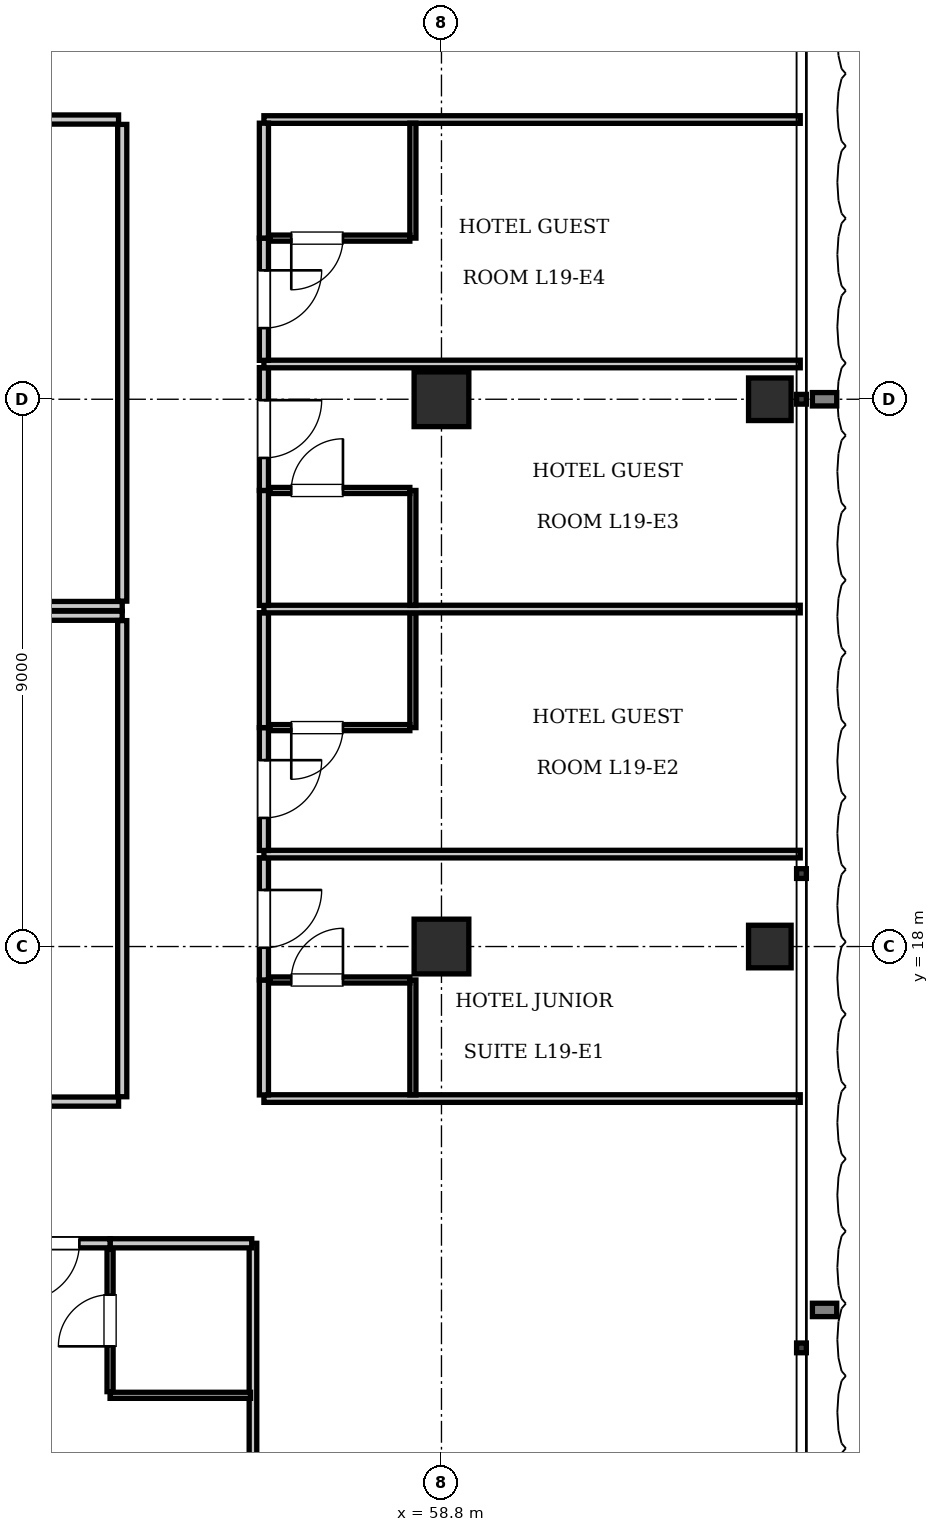
"""IFC4 building model, lengths in metres.
Left out: names, types, materials, properties, quantities, classifications, styles, units other than length and angle.
Written with IfcOpenShell. Run it as: python <this file> out.ifc"""

import sys

from ifc_helpers import new_model, si_unit, direction, frame, frame_2d, origin, origin_2d, place, context, subcontext, project, spatial, rectangle, i_section, extrude, element, fill, save


model = new_model("IFC4")
c1 = context("Model", 3, precision=1e-05, world=origin(), true_north=direction((0.0, 1.0)))
c2 = subcontext(c1, "Body", "Model", "MODEL_VIEW")
j1 = project(units=[si_unit("LENGTHUNIT", "METRE"), si_unit("PLANEANGLEUNIT", "RADIAN")], contexts=[c1])
p1 = place(None, origin())
s1 = spatial("IfcSite", under=j1, at=p1, CompositionType="ELEMENT")
p2 = place(p1, origin())
s2 = spatial("IfcBuilding", under=s1, at=p2, CompositionType="ELEMENT")
p3 = place(p2, frame((0.0, 0.0, 80.85)))
s3 = spatial("IfcBuildingStorey", under=s2, at=p3, CompositionType="ELEMENT", Elevation=80.85)
for number, where, z_axis, x_axis in (
    (1, (58.8, 18.0, 0.0), (0.0, 0.0, 1.0), (1.0, 0.0, 0.0)),
    (2, (58.8, 27.0, 0.0), (0.0, 0.0, 1.0), (1.0, 0.0, 0.0)),
):
    element("IfcColumn", number, at=place(p3, frame(where, z_axis=z_axis, x_axis=x_axis)), inside=s3, PredefinedType="COLUMN", context=c2, shape_type="SweptSolid", body=[
        extrude(rectangle(XDim=0.9, YDim=0.9, at=origin_2d()), origin(), (0.0, 0.0, 1.0), 3.85),
    ])
for number, where, z_axis, x_axis in (
    (3, (64.2, 18.0, 0.0), (0.0, 0.0, 1.0), (1.0, 0.0, 0.0)),
    (4, (64.2, 27.0, 0.0), (0.0, 0.0, 1.0), (1.0, 0.0, 0.0)),
):
    element("IfcColumn", number, at=place(p3, frame(where, z_axis=z_axis, x_axis=x_axis)), inside=s3, PredefinedType="COLUMN", context=c2, shape_type="SweptSolid", body=[
        extrude(i_section(OverallWidth=0.7, OverallDepth=0.7, WebThickness=0.028, FlangeThickness=0.044, at=origin_2d()), origin(), (0.0, 0.0, 1.0), 3.85),
    ])
p4 = place(p3, frame((22.05, 23.6, 0.0), z_axis=(0.0, 0.0, 1.0), x_axis=(1.0, 0.0, 0.0)))
e5 = element("IfcWall", 5, at=p4, inside=s3, PredefinedType="PARTITIONING", context=c2, shape_type="SweptSolid", body=[
    extrude(rectangle(XDim=31.5, YDim=0.15, at=frame_2d((15.75, 0.0))), origin(), (0.0, 0.0, 1.0), 3.61),
])
p5 = place(p3, frame((53.55, 23.68, 0.0), z_axis=(0.0, 0.0, 1.0), x_axis=(0.0, 1.0, 0.0)))
e6 = element("IfcWall", 6, at=p5, inside=s3, PredefinedType="PARTITIONING", context=c2, shape_type="SweptSolid", body=[
    extrude(rectangle(XDim=7.84, YDim=0.15, at=frame_2d((3.92, 0.0))), origin(), (0.0, 0.0, 1.0), 3.61),
])
p6 = place(p3, frame((42.87, 31.6, 0.0), z_axis=(0.0, 0.0, 1.0), x_axis=(1.0, 0.0, 0.0)))
e7 = element("IfcWall", 7, at=p6, inside=s3, PredefinedType="PARTITIONING", context=c2, shape_type="SweptSolid", body=[
    extrude(rectangle(XDim=10.62, YDim=0.15, at=frame_2d((5.31, 0.0))), origin(), (0.0, 0.0, 1.0), 3.61),
])
p7 = place(p6, frame((4.86, 0.0, 0.0)))
e8 = element("IfcOpeningElement", 8, at=p7, cuts=e7, PredefinedType="OPENING", context=c2, shape_type="SweptSolid", body=[
    extrude(rectangle(XDim=0.9, YDim=2.1, at=frame_2d((0.45, 1.05))), frame((0.0, 0.085, 0.0), z_axis=(0.0, -1.0, 0.0), x_axis=(1.0, 0.0, 0.0)), (0.0, 0.0, 1.0), 0.17),
])
p8 = place(p3, frame((22.05, 23.44, 0.0), z_axis=(0.0, 0.0, 1.0), x_axis=(1.0, 0.0, 0.0)))
e9 = element("IfcWall", 9, at=p8, inside=s3, PredefinedType="PARTITIONING", context=c2, shape_type="SweptSolid", body=[
    extrude(rectangle(XDim=31.5, YDim=0.15, at=frame_2d((15.75, 0.0))), origin(), (0.0, 0.0, 1.0), 3.61),
])
p9 = place(p3, frame((53.55, 15.53, 0.0), z_axis=(0.0, 0.0, 1.0), x_axis=(0.0, 1.0, 0.0)))
e10 = element("IfcWall", 10, at=p9, inside=s3, PredefinedType="PARTITIONING", context=c2, shape_type="SweptSolid", body=[
    extrude(rectangle(XDim=7.83, YDim=0.15, at=frame_2d((3.915, 0.0))), origin(), (0.0, 0.0, 1.0), 3.61),
])
p10 = place(p3, frame((40.035, 15.45, 0.0), z_axis=(0.0, 0.0, 1.0), x_axis=(1.0, 0.0, 0.0)))
e11 = element("IfcWall", 11, at=p10, inside=s3, PredefinedType="PARTITIONING", context=c2, shape_type="SweptSolid", body=[
    extrude(rectangle(XDim=13.455, YDim=0.15, at=frame_2d((6.728, 0.0))), origin(), (0.0, 0.0, 1.0), 3.61),
])
p11 = place(p10, frame((6.278, 0.0, 0.0)))
e12 = element("IfcOpeningElement", 12, at=p11, cuts=e11, PredefinedType="OPENING", context=c2, shape_type="SweptSolid", body=[
    extrude(rectangle(XDim=0.9, YDim=2.1, at=frame_2d((0.45, 1.05))), frame((0.0, 0.085, 0.0), z_axis=(0.0, -1.0, 0.0), x_axis=(1.0, 0.0, 0.0)), (0.0, 0.0, 1.0), 0.17),
])
p12 = place(p3, frame((55.7, 0.1, 0.0), z_axis=(0.0, 0.0, 1.0), x_axis=(0.0, 1.0, 0.0)))
e13 = element("IfcWall", 13, at=p12, inside=s3, PredefinedType="PARTITIONING", context=c2, shape_type="SweptSolid", body=[
    extrude(rectangle(XDim=13.02, YDim=0.125, at=frame_2d((6.51, 0.0))), origin(), (0.0, 0.0, 1.0), 3.61),
])
p13 = place(p3, frame((53.35, 13.12, 0.0), z_axis=(0.0, 0.0, 1.0), x_axis=(1.0, 0.0, 0.0)))
e14 = element("IfcWall", 14, at=p13, inside=s3, PredefinedType="PARTITIONING", context=c2, shape_type="SweptSolid", body=[
    extrude(rectangle(XDim=2.33, YDim=0.15, at=frame_2d((1.165, 0.0))), origin(), (0.0, 0.0, 1.0), 3.61),
])
p14 = place(p3, frame((53.35, 10.62, 0.0), z_axis=(0.0, 0.0, 1.0), x_axis=(1.0, 0.0, 0.0)))
e15 = element("IfcWall", 15, at=p14, inside=s3, PredefinedType="PARTITIONING", context=c2, shape_type="SweptSolid", body=[
    extrude(rectangle(XDim=2.31, YDim=0.1, at=frame_2d((1.155, 0.0))), origin(), (0.0, 0.0, 1.0), 3.61),
])
p15 = place(p3, frame((53.35, 10.68, 0.0), z_axis=(0.0, 0.0, 1.0), x_axis=(0.0, 1.0, 0.0)))
e16 = element("IfcWall", 16, at=p15, inside=s3, PredefinedType="PARTITIONING", context=c2, shape_type="SweptSolid", body=[
    extrude(rectangle(XDim=2.34, YDim=0.1, at=frame_2d((1.17, 0.0))), origin(), (0.0, 0.0, 1.0), 3.61),
])
p16 = place(p15, frame((0.745, 0.0, 0.0)))
e17 = element("IfcOpeningElement", 17, at=p16, cuts=e16, PredefinedType="OPENING", context=c2, shape_type="SweptSolid", body=[
    extrude(rectangle(XDim=0.85, YDim=2.1, at=frame_2d((0.425, 1.05))), frame((0.0, 0.06, 0.0), z_axis=(0.0, -1.0, 0.0), x_axis=(1.0, 0.0, 0.0)), (0.0, 0.0, 1.0), 0.12),
])
p17 = place(p3, frame((51.39, 13.12, 0.0), z_axis=(0.0, 0.0, 1.0), x_axis=(1.0, 0.0, 0.0)))
e18 = element("IfcWall", 18, at=p17, inside=s3, PredefinedType="PARTITIONING", context=c2, shape_type="SweptSolid", body=[
    extrude(rectangle(XDim=1.96, YDim=0.15, at=frame_2d((0.98, 0.0))), origin(), (0.0, 0.0, 1.0), 3.61),
])
p18 = place(p17, frame((0.505, 0.0, 0.0)))
e19 = element("IfcOpeningElement", 19, at=p18, cuts=e18, PredefinedType="OPENING", context=c2, shape_type="SweptSolid", body=[
    extrude(rectangle(XDim=0.95, YDim=2.15, at=frame_2d((0.475, 1.075))), frame((0.0, 0.085, 0.0), z_axis=(0.0, -1.0, 0.0), x_axis=(1.0, 0.0, 0.0)), (0.0, 0.0, 1.0), 0.17),
])
for number, where, z_axis, x_axis in (
    (20, (55.88, 15.5, 0.0), (0.0, 0.0, 1.0), (1.0, 0.0, 0.0)),
    (21, (55.88, 31.6, 0.0), (0.0, 0.0, 1.0), (1.0, 0.0, 0.0)),
):
    element("IfcWall", number, at=place(p3, frame(where, z_axis=z_axis, x_axis=x_axis)), inside=s3, PredefinedType="PARTITIONING", context=c2, shape_type="SweptSolid", body=[
        extrude(rectangle(XDim=8.82, YDim=0.125, at=frame_2d((4.41, 0.0))), origin(), (0.0, 0.0, 1.0), 3.61),
    ])
p19 = place(p3, frame((55.88, 15.56, 0.0), z_axis=(0.0, 0.0, 1.0), x_axis=(0.0, 1.0, 0.0)))
e22 = element("IfcWall", 22, at=p19, inside=s3, PredefinedType="PARTITIONING", context=c2, shape_type="SweptSolid", body=[
    extrude(rectangle(XDim=1.89, YDim=0.15, at=frame_2d((0.945, 0.0))), origin(), (0.0, 0.0, 1.0), 3.61),
])
p20 = place(p3, frame((55.88, 17.45, 0.0), z_axis=(0.0, 0.0, 1.0), x_axis=(0.0, 1.0, 0.0)))
e23 = element("IfcWall", 23, at=p20, inside=s3, PredefinedType="PARTITIONING", context=c2, shape_type="SweptSolid", body=[
    extrude(rectangle(XDim=2.01, YDim=0.15, at=frame_2d((1.005, 0.0))), origin(), (0.0, 0.0, 1.0), 3.61),
])
p21 = place(p20, frame((0.53, 0.0, 0.0)))
e24 = element("IfcOpeningElement", 24, at=p21, cuts=e23, PredefinedType="OPENING", context=c2, shape_type="SweptSolid", body=[
    extrude(rectangle(XDim=0.95, YDim=2.15, at=frame_2d((0.475, 1.075))), frame((0.0, 0.085, 0.0), z_axis=(0.0, -1.0, 0.0), x_axis=(1.0, 0.0, 0.0)), (0.0, 0.0, 1.0), 0.17),
])
p22 = place(p3, frame((58.33, 15.56, 0.0), z_axis=(0.0, 0.0, 1.0), x_axis=(0.0, 1.0, 0.0)))
e25 = element("IfcWall", 25, at=p22, inside=s3, PredefinedType="PARTITIONING", context=c2, shape_type="SweptSolid", body=[
    extrude(rectangle(XDim=1.89, YDim=0.1, at=frame_2d((0.945, 0.0))), origin(), (0.0, 0.0, 1.0), 3.61),
])
p23 = place(p3, frame((55.98, 17.45, 0.0), z_axis=(0.0, 0.0, 1.0), x_axis=(1.0, 0.0, 0.0)))
e26 = element("IfcWall", 26, at=p23, inside=s3, PredefinedType="PARTITIONING", context=c2, shape_type="SweptSolid", body=[
    extrude(rectangle(XDim=2.3, YDim=0.1, at=frame_2d((1.15, 0.0))), origin(), (0.0, 0.0, 1.0), 3.61),
])
p24 = place(p23, frame((0.35, 0.0, 0.0)))
e27 = element("IfcOpeningElement", 27, at=p24, cuts=e26, PredefinedType="OPENING", context=c2, shape_type="SweptSolid", body=[
    extrude(rectangle(XDim=0.85, YDim=2.1, at=frame_2d((0.425, 1.05))), frame((0.0, 0.06, 0.0), z_axis=(0.0, -1.0, 0.0), x_axis=(1.0, 0.0, 0.0)), (0.0, 0.0, 1.0), 0.12),
])
p25 = place(p3, frame((55.88, 19.52, 0.0), z_axis=(0.0, 0.0, 1.0), x_axis=(1.0, 0.0, 0.0)))
e28 = element("IfcWall", 28, at=p25, inside=s3, PredefinedType="PARTITIONING", context=c2, shape_type="SweptSolid", body=[
    extrude(rectangle(XDim=8.82, YDim=0.125, at=frame_2d((4.41, 0.0))), origin(), (0.0, 0.0, 1.0), 3.61),
])
p26 = place(p3, frame((55.88, 19.58, 0.0), z_axis=(0.0, 0.0, 1.0), x_axis=(0.0, 1.0, 0.0)))
e29 = element("IfcWall", 29, at=p26, inside=s3, PredefinedType="PARTITIONING", context=c2, shape_type="SweptSolid", body=[
    extrude(rectangle(XDim=2.02, YDim=0.15, at=frame_2d((1.01, 0.0))), origin(), (0.0, 0.0, 1.0), 3.61),
])
p27 = place(p26, frame((0.535, 0.0, 0.0)))
e30 = element("IfcOpeningElement", 30, at=p27, cuts=e29, PredefinedType="OPENING", context=c2, shape_type="SweptSolid", body=[
    extrude(rectangle(XDim=0.95, YDim=2.15, at=frame_2d((0.475, 1.075))), frame((0.0, 0.085, 0.0), z_axis=(0.0, -1.0, 0.0), x_axis=(1.0, 0.0, 0.0)), (0.0, 0.0, 1.0), 0.17),
])
p28 = place(p3, frame((55.88, 21.6, 0.0), z_axis=(0.0, 0.0, 1.0), x_axis=(0.0, 1.0, 0.0)))
e31 = element("IfcWall", 31, at=p28, inside=s3, PredefinedType="PARTITIONING", context=c2, shape_type="SweptSolid", body=[
    extrude(rectangle(XDim=1.89, YDim=0.15, at=frame_2d((0.945, 0.0))), origin(), (0.0, 0.0, 1.0), 3.61),
])
p29 = place(p3, frame((58.33, 21.6, 0.0), z_axis=(0.0, 0.0, 1.0), x_axis=(0.0, 1.0, 0.0)))
e32 = element("IfcWall", 32, at=p29, inside=s3, PredefinedType="PARTITIONING", context=c2, shape_type="SweptSolid", body=[
    extrude(rectangle(XDim=1.89, YDim=0.1, at=frame_2d((0.945, 0.0))), origin(), (0.0, 0.0, 1.0), 3.61),
])
p30 = place(p3, frame((55.98, 21.6, 0.0), z_axis=(0.0, 0.0, 1.0), x_axis=(1.0, 0.0, 0.0)))
e33 = element("IfcWall", 33, at=p30, inside=s3, PredefinedType="PARTITIONING", context=c2, shape_type="SweptSolid", body=[
    extrude(rectangle(XDim=2.3, YDim=0.1, at=frame_2d((1.15, 0.0))), origin(), (0.0, 0.0, 1.0), 3.61),
])
p31 = place(p30, frame((0.35, 0.0, 0.0)))
e34 = element("IfcOpeningElement", 34, at=p31, cuts=e33, PredefinedType="OPENING", context=c2, shape_type="SweptSolid", body=[
    extrude(rectangle(XDim=0.85, YDim=2.1, at=frame_2d((0.425, 1.05))), frame((0.0, 0.06, 0.0), z_axis=(0.0, -1.0, 0.0), x_axis=(1.0, 0.0, 0.0)), (0.0, 0.0, 1.0), 0.12),
])
p32 = place(p3, frame((55.88, 23.55, 0.0), z_axis=(0.0, 0.0, 1.0), x_axis=(1.0, 0.0, 0.0)))
e35 = element("IfcWall", 35, at=p32, inside=s3, PredefinedType="PARTITIONING", context=c2, shape_type="SweptSolid", body=[
    extrude(rectangle(XDim=8.82, YDim=0.125, at=frame_2d((4.41, 0.0))), origin(), (0.0, 0.0, 1.0), 3.61),
])
p33 = place(p3, frame((55.88, 23.61, 0.0), z_axis=(0.0, 0.0, 1.0), x_axis=(0.0, 1.0, 0.0)))
e36 = element("IfcWall", 36, at=p33, inside=s3, PredefinedType="PARTITIONING", context=c2, shape_type="SweptSolid", body=[
    extrude(rectangle(XDim=1.89, YDim=0.15, at=frame_2d((0.945, 0.0))), origin(), (0.0, 0.0, 1.0), 3.61),
])
p34 = place(p3, frame((55.88, 25.5, 0.0), z_axis=(0.0, 0.0, 1.0), x_axis=(0.0, 1.0, 0.0)))
e37 = element("IfcWall", 37, at=p34, inside=s3, PredefinedType="PARTITIONING", context=c2, shape_type="SweptSolid", body=[
    extrude(rectangle(XDim=2.02, YDim=0.15, at=frame_2d((1.01, 0.0))), origin(), (0.0, 0.0, 1.0), 3.61),
])
p35 = place(p34, frame((0.535, 0.0, 0.0)))
e38 = element("IfcOpeningElement", 38, at=p35, cuts=e37, PredefinedType="OPENING", context=c2, shape_type="SweptSolid", body=[
    extrude(rectangle(XDim=0.95, YDim=2.15, at=frame_2d((0.475, 1.075))), frame((0.0, 0.085, 0.0), z_axis=(0.0, -1.0, 0.0), x_axis=(1.0, 0.0, 0.0)), (0.0, 0.0, 1.0), 0.17),
])
p36 = place(p3, frame((58.33, 23.61, 0.0), z_axis=(0.0, 0.0, 1.0), x_axis=(0.0, 1.0, 0.0)))
e39 = element("IfcWall", 39, at=p36, inside=s3, PredefinedType="PARTITIONING", context=c2, shape_type="SweptSolid", body=[
    extrude(rectangle(XDim=1.89, YDim=0.1, at=frame_2d((0.945, 0.0))), origin(), (0.0, 0.0, 1.0), 3.61),
])
p37 = place(p3, frame((55.98, 25.5, 0.0), z_axis=(0.0, 0.0, 1.0), x_axis=(1.0, 0.0, 0.0)))
e40 = element("IfcWall", 40, at=p37, inside=s3, PredefinedType="PARTITIONING", context=c2, shape_type="SweptSolid", body=[
    extrude(rectangle(XDim=2.3, YDim=0.1, at=frame_2d((1.15, 0.0))), origin(), (0.0, 0.0, 1.0), 3.61),
])
p38 = place(p37, frame((0.35, 0.0, 0.0)))
e41 = element("IfcOpeningElement", 41, at=p38, cuts=e40, PredefinedType="OPENING", context=c2, shape_type="SweptSolid", body=[
    extrude(rectangle(XDim=0.85, YDim=2.1, at=frame_2d((0.425, 1.05))), frame((0.0, 0.06, 0.0), z_axis=(0.0, -1.0, 0.0), x_axis=(1.0, 0.0, 0.0)), (0.0, 0.0, 1.0), 0.12),
])
p39 = place(p3, frame((55.88, 27.58, 0.0), z_axis=(0.0, 0.0, 1.0), x_axis=(1.0, 0.0, 0.0)))
e42 = element("IfcWall", 42, at=p39, inside=s3, PredefinedType="PARTITIONING", context=c2, shape_type="SweptSolid", body=[
    extrude(rectangle(XDim=8.82, YDim=0.125, at=frame_2d((4.41, 0.0))), origin(), (0.0, 0.0, 1.0), 3.61),
])
p40 = place(p3, frame((55.88, 27.64, 0.0), z_axis=(0.0, 0.0, 1.0), x_axis=(0.0, 1.0, 0.0)))
e43 = element("IfcWall", 43, at=p40, inside=s3, PredefinedType="PARTITIONING", context=c2, shape_type="SweptSolid", body=[
    extrude(rectangle(XDim=2.01, YDim=0.15, at=frame_2d((1.005, 0.0))), origin(), (0.0, 0.0, 1.0), 3.61),
])
p41 = place(p40, frame((0.53, 0.0, 0.0)))
e44 = element("IfcOpeningElement", 44, at=p41, cuts=e43, PredefinedType="OPENING", context=c2, shape_type="SweptSolid", body=[
    extrude(rectangle(XDim=0.95, YDim=2.15, at=frame_2d((0.475, 1.075))), frame((0.0, 0.085, 0.0), z_axis=(0.0, -1.0, 0.0), x_axis=(1.0, 0.0, 0.0)), (0.0, 0.0, 1.0), 0.17),
])
p42 = place(p3, frame((55.88, 29.65, 0.0), z_axis=(0.0, 0.0, 1.0), x_axis=(0.0, 1.0, 0.0)))
e45 = element("IfcWall", 45, at=p42, inside=s3, PredefinedType="PARTITIONING", context=c2, shape_type="SweptSolid", body=[
    extrude(rectangle(XDim=1.89, YDim=0.15, at=frame_2d((0.945, 0.0))), origin(), (0.0, 0.0, 1.0), 3.61),
])
p43 = place(p3, frame((58.33, 29.65, 0.0), z_axis=(0.0, 0.0, 1.0), x_axis=(0.0, 1.0, 0.0)))
e46 = element("IfcWall", 46, at=p43, inside=s3, PredefinedType="PARTITIONING", context=c2, shape_type="SweptSolid", body=[
    extrude(rectangle(XDim=1.89, YDim=0.1, at=frame_2d((0.945, 0.0))), origin(), (0.0, 0.0, 1.0), 3.61),
])
p44 = place(p3, frame((55.98, 29.65, 0.0), z_axis=(0.0, 0.0, 1.0), x_axis=(1.0, 0.0, 0.0)))
e47 = element("IfcWall", 47, at=p44, inside=s3, PredefinedType="PARTITIONING", context=c2, shape_type="SweptSolid", body=[
    extrude(rectangle(XDim=2.3, YDim=0.1, at=frame_2d((1.15, 0.0))), origin(), (0.0, 0.0, 1.0), 3.61),
])
p45 = place(p44, frame((0.35, 0.0, 0.0)))
e48 = element("IfcOpeningElement", 48, at=p45, cuts=e47, PredefinedType="OPENING", context=c2, shape_type="SweptSolid", body=[
    extrude(rectangle(XDim=0.85, YDim=2.1, at=frame_2d((0.425, 1.05))), frame((0.0, 0.06, 0.0), z_axis=(0.0, -1.0, 0.0), x_axis=(1.0, 0.0, 0.0)), (0.0, 0.0, 1.0), 0.12),
])
p46 = place(p16, origin())
e49 = element("IfcDoor", 49, at=p46, inside=s3, OperationType="SINGLE_SWING_LEFT", PredefinedType="DOOR", context=c2, shape_type="SweptSolid", body=[
    extrude(rectangle(XDim=0.85, YDim=2.1, at=frame_2d((0.425, 1.05))), frame((0.0, 0.025, 0.0), z_axis=(0.0, -1.0, 0.0), x_axis=(1.0, 0.0, 0.0)), (0.0, 0.0, 1.0), 0.05),
])
fill(e17, e49)
p47 = place(p18, frame((0.95, 0.0, 0.0), z_axis=(0.0, 0.0, 1.0), x_axis=(-1.0, 0.0, 0.0)))
e50 = element("IfcDoor", 50, at=p47, inside=s3, OperationType="SINGLE_SWING_RIGHT", PredefinedType="DOOR", context=c2, shape_type="SweptSolid", body=[
    extrude(rectangle(XDim=0.95, YDim=2.15, at=frame_2d((0.475, 1.075))), frame((0.0, 0.025, 0.0), z_axis=(0.0, -1.0, 0.0), x_axis=(1.0, 0.0, 0.0)), (0.0, 0.0, 1.0), 0.05),
])
fill(e19, e50)
p48 = place(p24, origin())
e51 = element("IfcDoor", 51, at=p48, inside=s3, OperationType="SINGLE_SWING_RIGHT", PredefinedType="DOOR", context=c2, shape_type="SweptSolid", body=[
    extrude(rectangle(XDim=0.85, YDim=2.1, at=frame_2d((0.425, 1.05))), frame((0.0, 0.025, 0.0), z_axis=(0.0, -1.0, 0.0), x_axis=(1.0, 0.0, 0.0)), (0.0, 0.0, 1.0), 0.05),
])
fill(e27, e51)
p49 = place(p21, frame((0.95, 0.0, 0.0), z_axis=(0.0, 0.0, 1.0), x_axis=(-1.0, 0.0, 0.0)))
e52 = element("IfcDoor", 52, at=p49, inside=s3, OperationType="SINGLE_SWING_LEFT", PredefinedType="DOOR", context=c2, shape_type="SweptSolid", body=[
    extrude(rectangle(XDim=0.95, YDim=2.15, at=frame_2d((0.475, 1.075))), frame((0.0, 0.025, 0.0), z_axis=(0.0, -1.0, 0.0), x_axis=(1.0, 0.0, 0.0)), (0.0, 0.0, 1.0), 0.05),
])
fill(e24, e52)
p50 = place(p31, frame((0.85, 0.0, 0.0), z_axis=(0.0, 0.0, 1.0), x_axis=(-1.0, 0.0, 0.0)))
e53 = element("IfcDoor", 53, at=p50, inside=s3, OperationType="SINGLE_SWING_RIGHT", PredefinedType="DOOR", context=c2, shape_type="SweptSolid", body=[
    extrude(rectangle(XDim=0.85, YDim=2.1, at=frame_2d((0.425, 1.05))), frame((0.0, 0.025, 0.0), z_axis=(0.0, -1.0, 0.0), x_axis=(1.0, 0.0, 0.0)), (0.0, 0.0, 1.0), 0.05),
])
fill(e34, e53)
p51 = place(p27, frame((0.95, 0.0, 0.0), z_axis=(0.0, 0.0, 1.0), x_axis=(-1.0, 0.0, 0.0)))
e54 = element("IfcDoor", 54, at=p51, inside=s3, OperationType="SINGLE_SWING_LEFT", PredefinedType="DOOR", context=c2, shape_type="SweptSolid", body=[
    extrude(rectangle(XDim=0.95, YDim=2.15, at=frame_2d((0.475, 1.075))), frame((0.0, 0.025, 0.0), z_axis=(0.0, -1.0, 0.0), x_axis=(1.0, 0.0, 0.0)), (0.0, 0.0, 1.0), 0.05),
])
fill(e30, e54)
p52 = place(p38, origin())
e55 = element("IfcDoor", 55, at=p52, inside=s3, OperationType="SINGLE_SWING_RIGHT", PredefinedType="DOOR", context=c2, shape_type="SweptSolid", body=[
    extrude(rectangle(XDim=0.85, YDim=2.1, at=frame_2d((0.425, 1.05))), frame((0.0, 0.025, 0.0), z_axis=(0.0, -1.0, 0.0), x_axis=(1.0, 0.0, 0.0)), (0.0, 0.0, 1.0), 0.05),
])
fill(e41, e55)
p53 = place(p35, frame((0.95, 0.0, 0.0), z_axis=(0.0, 0.0, 1.0), x_axis=(-1.0, 0.0, 0.0)))
e56 = element("IfcDoor", 56, at=p53, inside=s3, OperationType="SINGLE_SWING_LEFT", PredefinedType="DOOR", context=c2, shape_type="SweptSolid", body=[
    extrude(rectangle(XDim=0.95, YDim=2.15, at=frame_2d((0.475, 1.075))), frame((0.0, 0.025, 0.0), z_axis=(0.0, -1.0, 0.0), x_axis=(1.0, 0.0, 0.0)), (0.0, 0.0, 1.0), 0.05),
])
fill(e38, e56)
p54 = place(p45, frame((0.85, 0.0, 0.0), z_axis=(0.0, 0.0, 1.0), x_axis=(-1.0, 0.0, 0.0)))
e57 = element("IfcDoor", 57, at=p54, inside=s3, OperationType="SINGLE_SWING_RIGHT", PredefinedType="DOOR", context=c2, shape_type="SweptSolid", body=[
    extrude(rectangle(XDim=0.85, YDim=2.1, at=frame_2d((0.425, 1.05))), frame((0.0, 0.025, 0.0), z_axis=(0.0, -1.0, 0.0), x_axis=(1.0, 0.0, 0.0)), (0.0, 0.0, 1.0), 0.05),
])
fill(e48, e57)
p55 = place(p41, frame((0.95, 0.0, 0.0), z_axis=(0.0, 0.0, 1.0), x_axis=(-1.0, 0.0, 0.0)))
e58 = element("IfcDoor", 58, at=p55, inside=s3, OperationType="SINGLE_SWING_LEFT", PredefinedType="DOOR", context=c2, shape_type="SweptSolid", body=[
    extrude(rectangle(XDim=0.95, YDim=2.15, at=frame_2d((0.475, 1.075))), frame((0.0, 0.025, 0.0), z_axis=(0.0, -1.0, 0.0), x_axis=(1.0, 0.0, 0.0)), (0.0, 0.0, 1.0), 0.05),
])
fill(e44, e58)
save(model, sys.argv[1])
